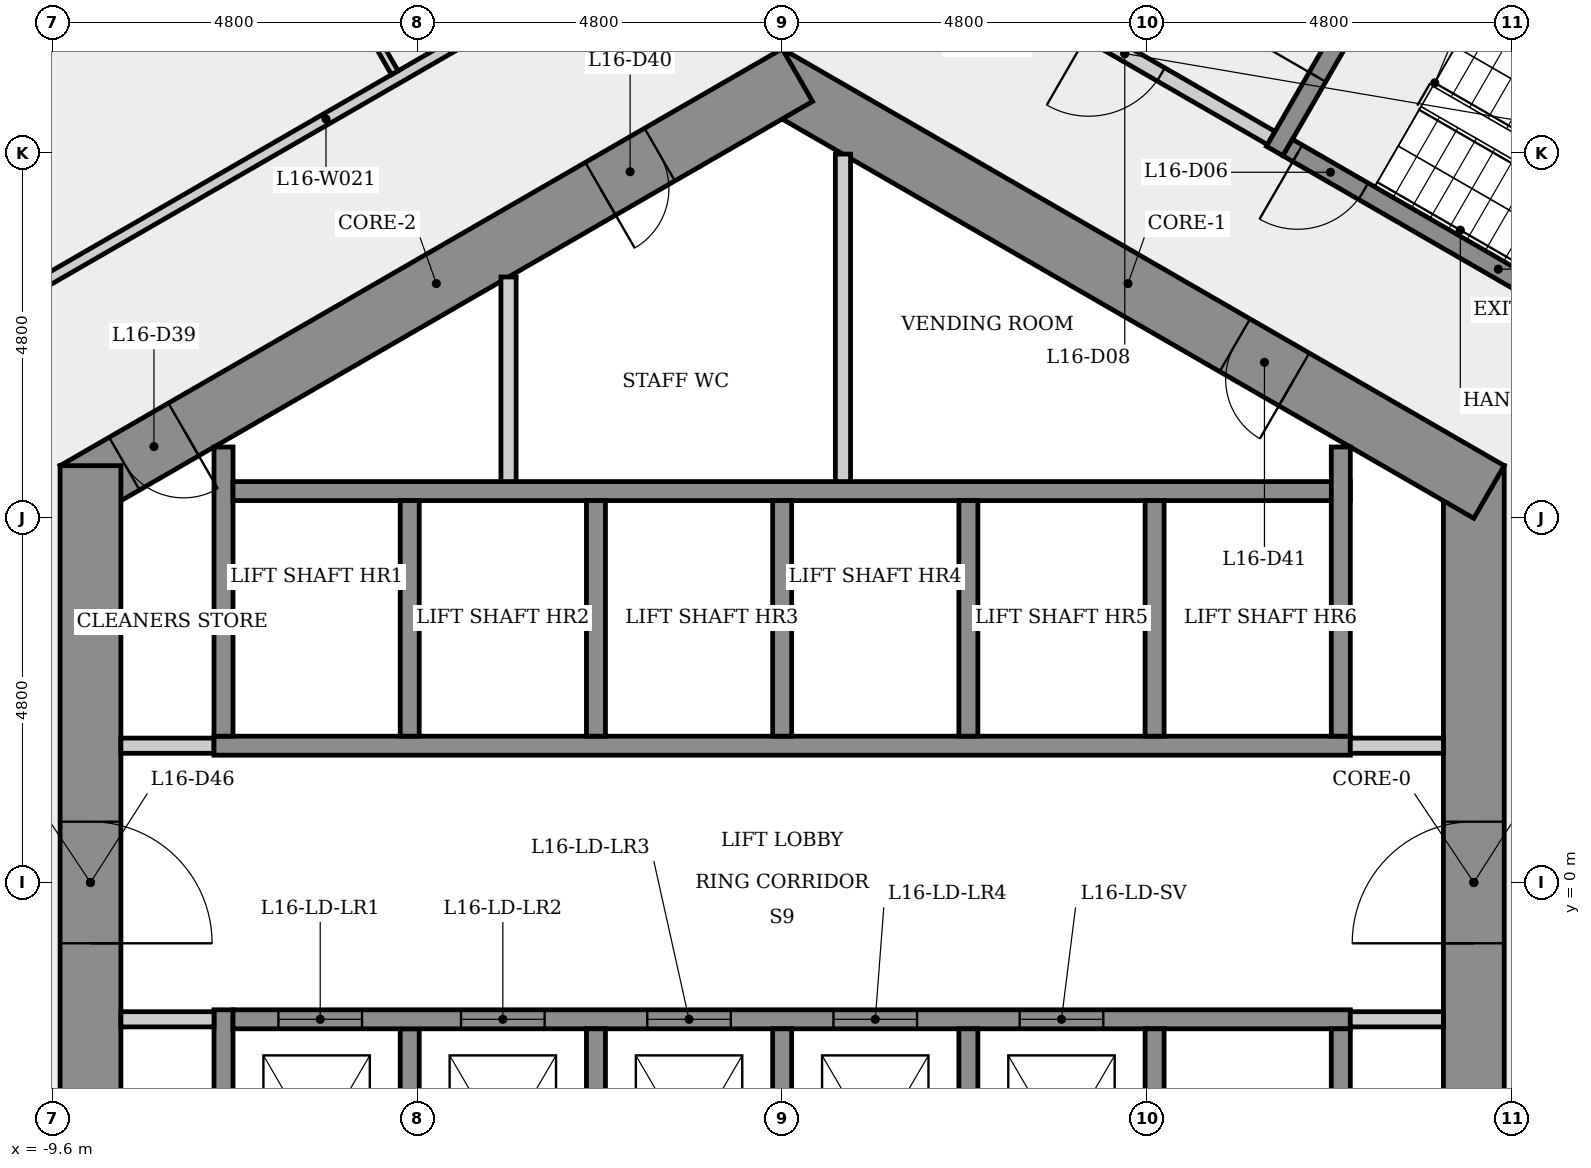
"""IFC4 building model, lengths in metres.
Left out: names, types, materials, properties, quantities, classifications, styles, units other than length and angle.
Written with IfcOpenShell. Run it as: python <this file> out.ifc"""

import sys

from ifc_helpers import new_model, si_unit, direction, frame, frame_2d, origin, place, context, subcontext, project, spatial, rectangle, extrude, element, fill, save


model = new_model("IFC4")
c1 = context("Model", 3, precision=1e-05, world=origin(), true_north=direction((0.0, 1.0)))
c2 = subcontext(c1, "Body", "Model", "MODEL_VIEW")
j1 = project(units=[si_unit("LENGTHUNIT", "METRE"), si_unit("PLANEANGLEUNIT", "RADIAN")], contexts=[c1])
p1 = place(None, origin())
s1 = spatial("IfcSite", under=j1, at=p1, CompositionType="ELEMENT")
p2 = place(p1, origin())
s2 = spatial("IfcBuilding", under=s1, at=p2, CompositionType="ELEMENT")
p3 = place(p2, frame((0.0, 0.0, 62.9)))
s3 = spatial("IfcBuildingStorey", under=s2, at=p3, CompositionType="ELEMENT", Elevation=62.9)
p4 = place(p3, frame((9.1, -5.485, 0.0), z_axis=(0.0, 0.0, 1.0), x_axis=(0.0, 1.0, 0.0)))
e1 = element("IfcWall", 1, at=p4, inside=s3, PredefinedType="SHEAR", context=c2, shape_type="SweptSolid", body=[
    extrude(rectangle(XDim=10.97, YDim=0.8, at=frame_2d((5.485, 0.0))), origin(), (0.0, 0.0, 1.0), 3.4),
])
p5 = place(p4, frame((4.685, 0.0, 0.0)))
e2 = element("IfcOpeningElement", 2, at=p5, cuts=e1, PredefinedType="OPENING", context=c2, shape_type="SweptSolid", body=[
    extrude(rectangle(XDim=1.6, YDim=2.1, at=frame_2d((0.8, 1.05))), frame((0.0, 0.41, 0.0), z_axis=(0.0, -1.0, 0.0), x_axis=(1.0, 0.0, 0.0)), (0.0, 0.0, 1.0), 0.82),
])
p6 = place(p3, frame((9.3, 5.138, 0.0), z_axis=(0.0, 0.0, 1.0), x_axis=(-0.866023993627, 0.500002442456, 0.0)))
e3 = element("IfcWall", 3, at=p6, inside=s3, PredefinedType="SHEAR", context=c2, shape_type="SweptSolid", body=[
    extrude(rectangle(XDim=10.97, YDim=0.8, at=frame_2d((5.485, 0.0))), origin(), (0.0, 0.0, 1.0), 3.4),
])
p7 = place(p6, frame((2.962, 0.0, 0.0)))
e4 = element("IfcOpeningElement", 4, at=p7, cuts=e3, PredefinedType="OPENING", context=c2, shape_type="SweptSolid", body=[
    extrude(rectangle(XDim=0.9, YDim=2.1, at=frame_2d((0.45, 1.05))), frame((0.0, 0.41, 0.0), z_axis=(0.0, -1.0, 0.0), x_axis=(1.0, 0.0, 0.0)), (0.0, 0.0, 1.0), 0.82),
])
p8 = place(p3, frame((0.2, 10.623, 0.0), z_axis=(0.0, 0.0, 1.0), x_axis=(-0.866023993627, -0.500002442456, 0.0)))
e5 = element("IfcWall", 5, at=p8, inside=s3, PredefinedType="SHEAR", context=c2, shape_type="SweptSolid", body=[
    extrude(rectangle(XDim=10.97, YDim=0.8, at=frame_2d((5.485, 0.0))), origin(), (0.0, 0.0, 1.0), 3.4),
])
p9 = place(p8, frame((9.325, 0.0, 0.0)))
e6 = element("IfcOpeningElement", 6, at=p9, cuts=e5, PredefinedType="OPENING", context=c2, shape_type="SweptSolid", body=[
    extrude(rectangle(XDim=0.9, YDim=2.1, at=frame_2d((0.45, 1.05))), frame((0.0, 0.41, 0.0), z_axis=(0.0, -1.0, 0.0), x_axis=(1.0, 0.0, 0.0)), (0.0, 0.0, 1.0), 0.82),
])
p10 = place(p8, frame((2.091, 0.0, 0.0)))
e7 = element("IfcOpeningElement", 7, at=p10, cuts=e5, PredefinedType="OPENING", context=c2, shape_type="SweptSolid", body=[
    extrude(rectangle(XDim=0.9, YDim=2.1, at=frame_2d((0.45, 1.05))), frame((0.0, 0.41, 0.0), z_axis=(0.0, -1.0, 0.0), x_axis=(1.0, 0.0, 0.0)), (0.0, 0.0, 1.0), 0.82),
])
p11 = place(p3, frame((-9.1, 5.485, 0.0), z_axis=(0.0, 0.0, 1.0), x_axis=(0.0, -1.0, 0.0)))
e8 = element("IfcWall", 8, at=p11, inside=s3, PredefinedType="SHEAR", context=c2, shape_type="SweptSolid", body=[
    extrude(rectangle(XDim=10.97, YDim=0.8, at=frame_2d((5.485, 0.0))), origin(), (0.0, 0.0, 1.0), 3.4),
])
p12 = place(p11, frame((4.685, 0.0, 0.0)))
e9 = element("IfcOpeningElement", 9, at=p12, cuts=e8, PredefinedType="OPENING", context=c2, shape_type="SweptSolid", body=[
    extrude(rectangle(XDim=1.6, YDim=2.1, at=frame_2d((0.8, 1.05))), frame((0.0, 0.41, 0.0), z_axis=(0.0, -1.0, 0.0), x_axis=(1.0, 0.0, 0.0)), (0.0, 0.0, 1.0), 0.82),
])
p13 = place(p3, frame((-10.729, 7.316, 0.0), z_axis=(0.0, 0.0, 1.0), x_axis=(0.86603401421, 0.499985086009, 0.0)))
e10 = element("IfcWall", 10, at=p13, inside=s3, PredefinedType="PARTITIONING", context=c2, shape_type="SweptSolid", body=[
    extrude(rectangle(XDim=10.917, YDim=0.15, at=frame_2d((5.458, 0.0))), origin(), (0.0, 0.0, 1.0), 3.0),
])
p14 = place(p3, frame((-8.7, 1.8, 0.0), z_axis=(0.0, 0.0, 1.0), x_axis=(1.0, 0.0, 0.0)))
e11 = element("IfcWall", 11, at=p14, inside=s3, PredefinedType="PARTITIONING", context=c2, shape_type="SweptSolid", body=[
    extrude(rectangle(XDim=1.225, YDim=0.2, at=frame_2d((0.613, 0.0))), origin(), (0.0, 0.0, 1.0), 3.0),
])
p15 = place(p3, frame((-7.475, 1.8, 0.0), z_axis=(0.0, 0.0, 1.0), x_axis=(1.0, 0.0, 0.0)))
e12 = element("IfcWall", 12, at=p15, inside=s3, PredefinedType="SHEAR", context=c2, shape_type="SweptSolid", body=[
    extrude(rectangle(XDim=14.95, YDim=0.25, at=frame_2d((7.475, 0.0))), origin(), (0.0, 0.0, 1.0), 3.0),
])
p16 = place(p3, frame((-7.35, -5.73, 0.0), z_axis=(0.0, 0.0, 1.0), x_axis=(0.0, 1.0, 0.0)))
e13 = element("IfcWall", 13, at=p16, inside=s3, PredefinedType="SHEAR", context=c2, shape_type="SweptSolid", body=[
    extrude(rectangle(XDim=4.055, YDim=0.25, at=frame_2d((2.028, 0.0))), origin(), (0.0, 0.0, 1.0), 3.0),
])
p17 = place(p3, frame((-7.35, 1.925, 0.0), z_axis=(0.0, 0.0, 1.0), x_axis=(0.0, 1.0, 0.0)))
e14 = element("IfcWall", 14, at=p17, inside=s3, PredefinedType="SHEAR", context=c2, shape_type="SweptSolid", body=[
    extrude(rectangle(XDim=3.805, YDim=0.25, at=frame_2d((1.903, 0.0))), origin(), (0.0, 0.0, 1.0), 3.0),
])
p18 = place(p3, frame((-7.225, 5.15, 0.0), z_axis=(0.0, 0.0, 1.0), x_axis=(1.0, 0.0, 0.0)))
e15 = element("IfcWall", 15, at=p18, inside=s3, PredefinedType="SHEAR", context=c2, shape_type="SweptSolid", body=[
    extrude(rectangle(XDim=14.7, YDim=0.25, at=frame_2d((7.35, 0.0))), origin(), (0.0, 0.0, 1.0), 3.0),
])
p19 = place(p3, frame((-7.475, -1.8, 0.0), z_axis=(0.0, 0.0, 1.0), x_axis=(-1.0, 0.0, 0.0)))
e16 = element("IfcWall", 16, at=p19, inside=s3, PredefinedType="PARTITIONING", context=c2, shape_type="SweptSolid", body=[
    extrude(rectangle(XDim=1.225, YDim=0.2, at=frame_2d((0.613, 0.0))), origin(), (0.0, 0.0, 1.0), 3.0),
])
p20 = place(p3, frame((-5.096, 10.654, 0.0), z_axis=(0.0, 0.0, 1.0), x_axis=(-0.500006994331, 0.866021365568, 0.0)))
e17 = element("IfcWall", 17, at=p20, inside=s3, PredefinedType="PARTITIONING", context=c2, shape_type="SweptSolid", body=[
    extrude(rectangle(XDim=9.606, YDim=0.1, at=frame_2d((4.803, 0.0))), origin(), (0.0, 0.0, 1.0), 3.0),
])
for number, where, z_axis, x_axis in (
    (18, (-4.9, -1.925, 0.0), (0.0, 0.0, 1.0), (0.0, -1.0, 0.0)),
    (19, (-4.9, 5.025, 0.0), (0.0, 0.0, 1.0), (0.0, -1.0, 0.0)),
):
    element("IfcWall", number, at=place(p3, frame(where, z_axis=z_axis, x_axis=x_axis)), inside=s3, PredefinedType="SHEAR", context=c2, shape_type="SweptSolid", body=[
        extrude(rectangle(XDim=3.1, YDim=0.25, at=frame_2d((1.55, 0.0))), origin(), (0.0, 0.0, 1.0), 3.4),
    ])
p21 = place(p3, frame((-7.225, -1.8, 0.0), z_axis=(0.0, 0.0, 1.0), x_axis=(1.0, 0.0, 0.0)))
e20 = element("IfcWall", 20, at=p21, inside=s3, PredefinedType="SHEAR", context=c2, shape_type="SweptSolid", body=[
    extrude(rectangle(XDim=14.7, YDim=0.25, at=frame_2d((7.35, 0.0))), origin(), (0.0, 0.0, 1.0), 3.0),
])
p22 = place(p21, frame((0.597, 0.0, 0.0)))
e21 = element("IfcOpeningElement", 21, at=p22, cuts=e20, PredefinedType="OPENING", context=c2, shape_type="SweptSolid", body=[
    extrude(rectangle(XDim=1.1, YDim=2.1, at=frame_2d((0.55, 1.05))), frame((0.0, 0.135, 0.0), z_axis=(0.0, -1.0, 0.0), x_axis=(1.0, 0.0, 0.0)), (0.0, 0.0, 1.0), 0.27),
])
p23 = place(p21, frame((3.0, 0.0, 0.0)))
e22 = element("IfcOpeningElement", 22, at=p23, cuts=e20, PredefinedType="OPENING", context=c2, shape_type="SweptSolid", body=[
    extrude(rectangle(XDim=1.1, YDim=2.1, at=frame_2d((0.55, 1.05))), frame((0.0, 0.135, 0.0), z_axis=(0.0, -1.0, 0.0), x_axis=(1.0, 0.0, 0.0)), (0.0, 0.0, 1.0), 0.27),
])
p24 = place(p21, frame((5.45, 0.0, 0.0)))
e23 = element("IfcOpeningElement", 23, at=p24, cuts=e20, PredefinedType="OPENING", context=c2, shape_type="SweptSolid", body=[
    extrude(rectangle(XDim=1.1, YDim=2.1, at=frame_2d((0.55, 1.05))), frame((0.0, 0.135, 0.0), z_axis=(0.0, -1.0, 0.0), x_axis=(1.0, 0.0, 0.0)), (0.0, 0.0, 1.0), 0.27),
])
p25 = place(p21, frame((7.9, 0.0, 0.0)))
e24 = element("IfcOpeningElement", 24, at=p25, cuts=e20, PredefinedType="OPENING", context=c2, shape_type="SweptSolid", body=[
    extrude(rectangle(XDim=1.1, YDim=2.1, at=frame_2d((0.55, 1.05))), frame((0.0, 0.135, 0.0), z_axis=(0.0, -1.0, 0.0), x_axis=(1.0, 0.0, 0.0)), (0.0, 0.0, 1.0), 0.27),
])
p26 = place(p21, frame((10.35, 0.0, 0.0)))
e25 = element("IfcOpeningElement", 25, at=p26, cuts=e20, PredefinedType="OPENING", context=c2, shape_type="SweptSolid", body=[
    extrude(rectangle(XDim=1.1, YDim=2.1, at=frame_2d((0.55, 1.05))), frame((0.0, 0.135, 0.0), z_axis=(0.0, -1.0, 0.0), x_axis=(1.0, 0.0, 0.0)), (0.0, 0.0, 1.0), 0.27),
])
p27 = place(p3, frame((-3.6, 7.967, 0.0), z_axis=(0.0, 0.0, 1.0), x_axis=(0.0, -1.0, 0.0)))
e26 = element("IfcWall", 26, at=p27, inside=s3, PredefinedType="PARTITIONING", context=c2, shape_type="SweptSolid", body=[
    extrude(rectangle(XDim=2.692, YDim=0.2, at=frame_2d((1.346, 0.0))), origin(), (0.0, 0.0, 1.0), 3.0),
])
for number, where, z_axis, x_axis in (
    (27, (-2.45, -1.925, 0.0), (0.0, 0.0, 1.0), (0.0, -1.0, 0.0)),
    (28, (-2.45, 5.025, 0.0), (0.0, 0.0, 1.0), (0.0, -1.0, 0.0)),
    (29, (0.0, -1.925, 0.0), (0.0, 0.0, 1.0), (0.0, -1.0, 0.0)),
    (30, (0.0, 5.025, 0.0), (0.0, 0.0, 1.0), (0.0, -1.0, 0.0)),
):
    element("IfcWall", number, at=place(p3, frame(where, z_axis=z_axis, x_axis=x_axis)), inside=s3, PredefinedType="SHEAR", context=c2, shape_type="SweptSolid", body=[
        extrude(rectangle(XDim=3.1, YDim=0.25, at=frame_2d((1.55, 0.0))), origin(), (0.0, 0.0, 1.0), 3.4),
    ])
p28 = place(p3, frame((0.8, 9.584, 0.0), z_axis=(0.0, 0.0, 1.0), x_axis=(0.0, -1.0, 0.0)))
e31 = element("IfcWall", 31, at=p28, inside=s3, PredefinedType="PARTITIONING", context=c2, shape_type="SweptSolid", body=[
    extrude(rectangle(XDim=4.309, YDim=0.2, at=frame_2d((2.155, 0.0))), origin(), (0.0, 0.0, 1.0), 3.0),
])
for number, where, z_axis, x_axis in (
    (32, (2.45, -1.925, 0.0), (0.0, 0.0, 1.0), (0.0, -1.0, 0.0)),
    (33, (2.45, 5.025, 0.0), (0.0, 0.0, 1.0), (0.0, -1.0, 0.0)),
    (34, (4.9, -1.925, 0.0), (0.0, 0.0, 1.0), (0.0, -1.0, 0.0)),
    (35, (4.9, 5.025, 0.0), (0.0, 0.0, 1.0), (0.0, -1.0, 0.0)),
):
    element("IfcWall", number, at=place(p3, frame(where, z_axis=z_axis, x_axis=x_axis)), inside=s3, PredefinedType="SHEAR", context=c2, shape_type="SweptSolid", body=[
        extrude(rectangle(XDim=3.1, YDim=0.25, at=frame_2d((1.55, 0.0))), origin(), (0.0, 0.0, 1.0), 3.4),
    ])
p29 = place(p3, frame((6.435, 9.795, 0.0), z_axis=(0.0, 0.0, 1.0), x_axis=(-0.866012907634, 0.500021643343, 0.0)))
e36 = element("IfcWall", 36, at=p29, inside=s3, PredefinedType="PARTITIONING", context=c2, shape_type="SweptSolid", body=[
    extrude(rectangle(XDim=4.45, YDim=0.2, at=frame_2d((2.225, 0.0))), origin(), (0.0, 0.0, 1.0), 3.0),
])
p30 = place(p29, frame((1.675, 0.0, 0.0)))
e37 = element("IfcOpeningElement", 37, at=p30, cuts=e36, PredefinedType="OPENING", context=c2, shape_type="SweptSolid", body=[
    extrude(rectangle(XDim=1.1, YDim=2.1, at=frame_2d((0.55, 1.05))), frame((0.0, 0.11, 0.0), z_axis=(0.0, -1.0, 0.0), x_axis=(1.0, 0.0, 0.0)), (0.0, 0.0, 1.0), 0.22),
])
p31 = place(p3, frame((6.48, 9.624, 0.0), z_axis=(0.0, 0.0, 1.0), x_axis=(0.500017246033, 0.866015446554, 0.0)))
e38 = element("IfcWall", 38, at=p31, inside=s3, PredefinedType="SHEAR", context=c2, shape_type="SweptSolid", body=[
    extrude(rectangle(XDim=3.25, YDim=0.25, at=frame_2d((1.625, 0.0))), origin(), (0.0, 0.0, 1.0), 3.0),
])
p32 = place(p31, frame((1.125, 0.0, 0.0)))
e39 = element("IfcOpeningElement", 39, at=p32, cuts=e38, PredefinedType="OPENING", context=c2, shape_type="SweptSolid", body=[
    extrude(rectangle(XDim=1.0, YDim=2.1, at=frame_2d((0.5, 1.05))), frame((0.0, 0.135, 0.0), z_axis=(0.0, -1.0, 0.0), x_axis=(1.0, 0.0, 0.0)), (0.0, 0.0, 1.0), 0.27),
])
p33 = place(p3, frame((7.475, 1.8, 0.0), z_axis=(0.0, 0.0, 1.0), x_axis=(1.0, 0.0, 0.0)))
e40 = element("IfcWall", 40, at=p33, inside=s3, PredefinedType="PARTITIONING", context=c2, shape_type="SweptSolid", body=[
    extrude(rectangle(XDim=1.225, YDim=0.2, at=frame_2d((0.613, 0.0))), origin(), (0.0, 0.0, 1.0), 3.0),
])
for number, where, z_axis, x_axis in (
    (41, (7.35, -1.925, 0.0), (0.0, 0.0, 1.0), (0.0, -1.0, 0.0)),
    (42, (7.35, 5.73, 0.0), (0.0, 0.0, 1.0), (0.0, -1.0, 0.0)),
):
    element("IfcWall", number, at=place(p3, frame(where, z_axis=z_axis, x_axis=x_axis)), inside=s3, PredefinedType="SHEAR", context=c2, shape_type="SweptSolid", body=[
        extrude(rectangle(XDim=3.805, YDim=0.25, at=frame_2d((1.903, 0.0))), origin(), (0.0, 0.0, 1.0), 3.0),
    ])
p34 = place(p3, frame((8.151, 12.268, 0.0), z_axis=(0.0, 0.0, 1.0), x_axis=(0.866025499775, -0.499999833739, 0.0)))
e43 = element("IfcWall", 43, at=p34, inside=s3, PredefinedType="SHEAR", context=c2, shape_type="SweptSolid", body=[
    extrude(rectangle(XDim=6.4, YDim=0.25, at=frame_2d((3.2, 0.0))), origin(), (0.0, 0.0, 1.0), 3.0),
])
p35 = place(p3, frame((8.7, -1.8, 0.0), z_axis=(0.0, 0.0, 1.0), x_axis=(-1.0, 0.0, 0.0)))
e44 = element("IfcWall", 44, at=p35, inside=s3, PredefinedType="PARTITIONING", context=c2, shape_type="SweptSolid", body=[
    extrude(rectangle(XDim=1.225, YDim=0.2, at=frame_2d((0.613, 0.0))), origin(), (0.0, 0.0, 1.0), 3.0),
])
p36 = place(p3, frame((12.194, 6.47, 0.0), z_axis=(0.0, 0.0, 1.0), x_axis=(-0.866025499775, 0.499999833739, 0.0)))
e45 = element("IfcWall", 45, at=p36, inside=s3, PredefinedType="SHEAR", context=c2, shape_type="SweptSolid", body=[
    extrude(rectangle(XDim=6.4, YDim=0.25, at=frame_2d((3.2, 0.0))), origin(), (0.0, 0.0, 1.0), 3.0),
])
p37 = place(p36, frame((5.25, 0.0, 0.0)))
e46 = element("IfcOpeningElement", 46, at=p37, cuts=e45, PredefinedType="OPENING", context=c2, shape_type="SweptSolid", body=[
    extrude(rectangle(XDim=1.0, YDim=2.1, at=frame_2d((0.5, 1.05))), frame((0.0, 0.135, 0.0), z_axis=(0.0, -1.0, 0.0), x_axis=(1.0, 0.0, 0.0)), (0.0, 0.0, 1.0), 0.27),
])
p38 = place(p22, origin())
e47 = element("IfcDoor", 47, at=p38, inside=s3, OperationType="SLIDING_TO_LEFT", PredefinedType="DOOR", context=c2, shape_type="SweptSolid", body=[
    extrude(rectangle(XDim=1.1, YDim=2.1, at=frame_2d((0.55, 1.05))), frame((0.0, 0.025, 0.0), z_axis=(0.0, -1.0, 0.0), x_axis=(1.0, 0.0, 0.0)), (0.0, 0.0, 1.0), 0.05),
])
fill(e21, e47)
p39 = place(p23, origin())
e48 = element("IfcDoor", 48, at=p39, inside=s3, OperationType="SLIDING_TO_LEFT", PredefinedType="DOOR", context=c2, shape_type="SweptSolid", body=[
    extrude(rectangle(XDim=1.1, YDim=2.1, at=frame_2d((0.55, 1.05))), frame((0.0, 0.025, 0.0), z_axis=(0.0, -1.0, 0.0), x_axis=(1.0, 0.0, 0.0)), (0.0, 0.0, 1.0), 0.05),
])
fill(e22, e48)
p40 = place(p24, origin())
e49 = element("IfcDoor", 49, at=p40, inside=s3, OperationType="SLIDING_TO_LEFT", PredefinedType="DOOR", context=c2, shape_type="SweptSolid", body=[
    extrude(rectangle(XDim=1.1, YDim=2.1, at=frame_2d((0.55, 1.05))), frame((0.0, 0.025, 0.0), z_axis=(0.0, -1.0, 0.0), x_axis=(1.0, 0.0, 0.0)), (0.0, 0.0, 1.0), 0.05),
])
fill(e23, e49)
p41 = place(p25, origin())
e50 = element("IfcDoor", 50, at=p41, inside=s3, OperationType="SLIDING_TO_LEFT", PredefinedType="DOOR", context=c2, shape_type="SweptSolid", body=[
    extrude(rectangle(XDim=1.1, YDim=2.1, at=frame_2d((0.55, 1.05))), frame((0.0, 0.025, 0.0), z_axis=(0.0, -1.0, 0.0), x_axis=(1.0, 0.0, 0.0)), (0.0, 0.0, 1.0), 0.05),
])
fill(e24, e50)
p42 = place(p26, origin())
e51 = element("IfcDoor", 51, at=p42, inside=s3, OperationType="SLIDING_TO_LEFT", PredefinedType="DOOR", context=c2, shape_type="SweptSolid", body=[
    extrude(rectangle(XDim=1.1, YDim=2.1, at=frame_2d((0.55, 1.05))), frame((0.0, 0.025, 0.0), z_axis=(0.0, -1.0, 0.0), x_axis=(1.0, 0.0, 0.0)), (0.0, 0.0, 1.0), 0.05),
])
fill(e25, e51)
p43 = place(p37, origin())
e52 = element("IfcDoor", 52, at=p43, inside=s3, OperationType="SINGLE_SWING_RIGHT", PredefinedType="DOOR", context=c2, shape_type="SweptSolid", body=[
    extrude(rectangle(XDim=1.0, YDim=2.1, at=frame_2d((0.5, 1.05))), frame((0.0, 0.025, 0.0), z_axis=(0.0, -1.0, 0.0), x_axis=(1.0, 0.0, 0.0)), (0.0, 0.0, 1.0), 0.05),
])
fill(e46, e52)
p44 = place(p32, origin())
e53 = element("IfcDoor", 53, at=p44, inside=s3, OperationType="SINGLE_SWING_LEFT", PredefinedType="DOOR", context=c2, shape_type="SweptSolid", body=[
    extrude(rectangle(XDim=1.0, YDim=2.1, at=frame_2d((0.5, 1.05))), frame((0.0, 0.025, 0.0), z_axis=(0.0, -1.0, 0.0), x_axis=(1.0, 0.0, 0.0)), (0.0, 0.0, 1.0), 0.05),
])
fill(e39, e53)
p45 = place(p30, origin())
e54 = element("IfcDoor", 54, at=p45, inside=s3, OperationType="SINGLE_SWING_RIGHT", PredefinedType="DOOR", context=c2, shape_type="SweptSolid", body=[
    extrude(rectangle(XDim=1.1, YDim=2.1, at=frame_2d((0.55, 1.05))), frame((0.0, 0.025, 0.0), z_axis=(0.0, -1.0, 0.0), x_axis=(1.0, 0.0, 0.0)), (0.0, 0.0, 1.0), 0.05),
])
fill(e37, e54)
p46 = place(p9, origin())
e55 = element("IfcDoor", 55, at=p46, inside=s3, OperationType="SINGLE_SWING_LEFT", PredefinedType="DOOR", context=c2, shape_type="SweptSolid", body=[
    extrude(rectangle(XDim=0.9, YDim=2.1, at=frame_2d((0.45, 1.05))), frame((0.0, 0.025, 0.0), z_axis=(0.0, -1.0, 0.0), x_axis=(1.0, 0.0, 0.0)), (0.0, 0.0, 1.0), 0.05),
])
fill(e6, e55)
p47 = place(p10, origin())
e56 = element("IfcDoor", 56, at=p47, inside=s3, OperationType="SINGLE_SWING_RIGHT", PredefinedType="DOOR", context=c2, shape_type="SweptSolid", body=[
    extrude(rectangle(XDim=0.9, YDim=2.1, at=frame_2d((0.45, 1.05))), frame((0.0, 0.025, 0.0), z_axis=(0.0, -1.0, 0.0), x_axis=(1.0, 0.0, 0.0)), (0.0, 0.0, 1.0), 0.05),
])
fill(e7, e56)
p48 = place(p7, origin())
e57 = element("IfcDoor", 57, at=p48, inside=s3, OperationType="SINGLE_SWING_LEFT", PredefinedType="DOOR", context=c2, shape_type="SweptSolid", body=[
    extrude(rectangle(XDim=0.9, YDim=2.1, at=frame_2d((0.45, 1.05))), frame((0.0, 0.025, 0.0), z_axis=(0.0, -1.0, 0.0), x_axis=(1.0, 0.0, 0.0)), (0.0, 0.0, 1.0), 0.05),
])
fill(e4, e57)
p49 = place(p5, origin())
e58 = element("IfcDoor", 58, at=p49, inside=s3, OperationType="SINGLE_SWING_LEFT", PredefinedType="DOOR", context=c2, shape_type="SweptSolid", body=[
    extrude(rectangle(XDim=1.6, YDim=2.1, at=frame_2d((0.8, 1.05))), frame((0.0, 0.025, 0.0), z_axis=(0.0, -1.0, 0.0), x_axis=(1.0, 0.0, 0.0)), (0.0, 0.0, 1.0), 0.05),
])
fill(e2, e58)
p50 = place(p12, origin())
e59 = element("IfcDoor", 59, at=p50, inside=s3, OperationType="SINGLE_SWING_RIGHT", PredefinedType="DOOR", context=c2, shape_type="SweptSolid", body=[
    extrude(rectangle(XDim=1.6, YDim=2.1, at=frame_2d((0.8, 1.05))), frame((0.0, 0.025, 0.0), z_axis=(0.0, -1.0, 0.0), x_axis=(1.0, 0.0, 0.0)), (0.0, 0.0, 1.0), 0.05),
])
fill(e9, e59)
save(model, sys.argv[1])
